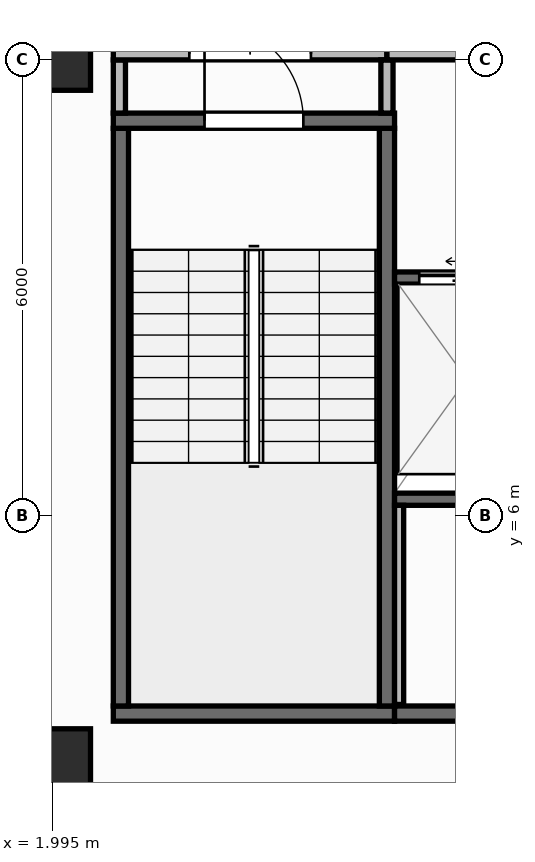
"""IFC4 building model, lengths in metres.
Left out: names, types, materials, properties, quantities, classifications, styles, units other than length and angle.
Written with IfcOpenShell. Run it as: python <this file> out.ifc"""

import sys

from ifc_helpers import new_model, si_unit, direction, frame, frame_2d, origin, origin_2d, place, context, subcontext, project, spatial, rectangle, extrude, element, fill, save


model = new_model("IFC4")
c1 = context("Model", 3, precision=1e-05, world=origin(), true_north=direction((0.0, 1.0)))
c2 = subcontext(c1, "Body", "Model", "MODEL_VIEW")
j1 = project(units=[si_unit("LENGTHUNIT", "METRE"), si_unit("PLANEANGLEUNIT", "RADIAN")], contexts=[c1])
p1 = place(None, origin())
s1 = spatial("IfcSite", under=j1, at=p1, CompositionType="ELEMENT")
p2 = place(p1, origin())
s2 = spatial("IfcBuilding", under=s1, at=p2, CompositionType="ELEMENT")
p3 = place(p2, frame((0.0, 0.0, 268.4)))
s3 = spatial("IfcBuildingStorey", under=s2, at=p3, CompositionType="ELEMENT", Elevation=268.4)
for number, where, z_axis, x_axis in (
    (1, (2.1, 2.8, 0.0), (0.0, 0.0, 1.0), (1.0, 0.0, 0.0)),
    (2, (2.1, 12.0, 0.0), (0.0, 0.0, 1.0), (1.0, 0.0, 0.0)),
):
    element("IfcColumn", number, at=place(p3, frame(where, z_axis=z_axis, x_axis=x_axis)), inside=s3, PredefinedType="COLUMN", context=c2, shape_type="SweptSolid", body=[
        extrude(rectangle(XDim=0.8, YDim=0.8, at=origin_2d()), origin(), (0.0, 0.0, 1.0), 3.95),
    ])
p4 = place(p3, frame((2.56, 0.173, 0.0), z_axis=(0.0, 0.0, 1.0), x_axis=(0.996798206282, 0.079958338856, 0.0)))
e3 = element("IfcWall", 3, at=p4, inside=s3, PredefinedType="STANDARD", context=c2, shape_type="SweptSolid", body=[
    extrude(rectangle(XDim=37.199, YDim=0.26, at=frame_2d((18.6, 0.0))), origin(), (0.0, 0.0, 1.0), 3.71),
])
p5 = place(p4, frame((17.4, 0.0, 0.9)))
e4 = element("IfcOpeningElement", 4, at=p5, cuts=e3, PredefinedType="OPENING", context=c2, shape_type="SweptSolid", body=[
    extrude(rectangle(XDim=2.4, YDim=1.65, at=frame_2d((1.2, 0.825))), frame((0.0, 0.14, 0.0), z_axis=(0.0, -1.0, 0.0), x_axis=(1.0, 0.0, 0.0)), (0.0, 0.0, 1.0), 0.28),
])
p6 = place(p3, frame((2.8, 3.4, 0.0), z_axis=(0.0, 0.0, 1.0), x_axis=(1.0, 0.0, 0.0)))
e5 = element("IfcWall", 5, at=p6, inside=s3, PredefinedType="SHEAR", context=c2, shape_type="SweptSolid", body=[
    extrude(rectangle(XDim=3.7, YDim=0.2, at=frame_2d((1.85, 0.0))), origin(), (0.0, 0.0, 1.0), 3.71),
])
for number, where, z_axis, x_axis in (
    (6, (2.9, 3.5, 0.0), (0.0, 0.0, 1.0), (0.0, 1.0, 0.0)),
    (7, (6.4, 3.5, 0.0), (0.0, 0.0, 1.0), (0.0, 1.0, 0.0)),
):
    element("IfcWall", number, at=place(p3, frame(where, z_axis=z_axis, x_axis=x_axis)), inside=s3, PredefinedType="SHEAR", context=c2, shape_type="SweptSolid", body=[
        extrude(rectangle(XDim=7.6, YDim=0.2, at=frame_2d((3.8, 0.0))), origin(), (0.0, 0.0, 1.0), 3.71),
    ])
p7 = place(p3, frame((2.8, 11.2, 0.0), z_axis=(0.0, 0.0, 1.0), x_axis=(1.0, 0.0, 0.0)))
e8 = element("IfcWall", 8, at=p7, inside=s3, PredefinedType="SHEAR", context=c2, shape_type="SweptSolid", body=[
    extrude(rectangle(XDim=3.7, YDim=0.2, at=frame_2d((1.85, 0.0))), origin(), (0.0, 0.0, 1.0), 3.71),
])
p8 = place(p7, frame((1.2, 0.0, 0.0)))
e9 = element("IfcOpeningElement", 9, at=p8, cuts=e8, PredefinedType="OPENING", context=c2, shape_type="SweptSolid", body=[
    extrude(rectangle(XDim=1.3, YDim=2.15, at=frame_2d((0.65, 1.075))), frame((0.0, 0.11, 0.0), z_axis=(0.0, -1.0, 0.0), x_axis=(1.0, 0.0, 0.0)), (0.0, 0.0, 1.0), 0.22),
])
p9 = place(p3, frame((6.5, 3.4, 0.0), z_axis=(0.0, 0.0, 1.0), x_axis=(1.0, 0.0, 0.0)))
e10 = element("IfcWall", 10, at=p9, inside=s3, PredefinedType="SHEAR", context=c2, shape_type="SweptSolid", body=[
    extrude(rectangle(XDim=13.7, YDim=0.2, at=frame_2d((6.85, 0.0))), origin(), (0.0, 0.0, 1.0), 3.71),
])
p10 = place(p3, frame((6.5, 6.22, 0.0), z_axis=(0.0, 0.0, 1.0), x_axis=(1.0, 0.0, 0.0)))
e11 = element("IfcWall", 11, at=p10, inside=s3, PredefinedType="SHEAR", context=c2, shape_type="SweptSolid", body=[
    extrude(rectangle(XDim=12.11, YDim=0.16, at=frame_2d((6.055, 0.0))), origin(), (0.0, 0.0, 1.0), 3.71),
])
p11 = place(p3, frame((6.5, 9.13, 0.0), z_axis=(0.0, 0.0, 1.0), x_axis=(1.0, 0.0, 0.0)))
e12 = element("IfcWall", 12, at=p11, inside=s3, PredefinedType="SHEAR", context=c2, shape_type="SweptSolid", body=[
    extrude(rectangle(XDim=1.975, YDim=0.16, at=frame_2d((0.988, 0.0))), origin(), (0.0, 0.0, 1.0), 3.71),
])
p12 = place(p11, frame((0.325, 0.0, 0.0)))
e13 = element("IfcOpeningElement", 13, at=p12, cuts=e12, PredefinedType="OPENING", context=c2, shape_type="SweptSolid", body=[
    extrude(rectangle(XDim=1.25, YDim=2.15, at=frame_2d((0.625, 1.075))), frame((0.0, 0.09, 0.0), z_axis=(0.0, -1.0, 0.0), x_axis=(1.0, 0.0, 0.0)), (0.0, 0.0, 1.0), 0.18),
])
p13 = place(p3, frame((6.56, 3.52, 0.0), z_axis=(0.0, 0.0, 1.0), x_axis=(0.0, 1.0, 0.0)))
e14 = element("IfcWall", 14, at=p13, inside=s3, PredefinedType="PARTITIONING", context=c2, shape_type="SweptSolid", body=[
    extrude(rectangle(XDim=2.62, YDim=0.12, at=frame_2d((1.31, 0.0))), origin(), (0.0, 0.0, 1.0), 3.71),
])
p14 = place(p3, frame((2.88, 11.3, 0.0), z_axis=(0.0, 0.0, 1.0), x_axis=(0.0, 1.0, 0.0)))
e15 = element("IfcWall", 15, at=p14, inside=s3, PredefinedType="PARTITIONING", context=c2, shape_type="SweptSolid", body=[
    extrude(rectangle(XDim=0.7, YDim=0.16, at=frame_2d((0.35, 0.0))), origin(), (0.0, 0.0, 1.0), 3.71),
])
p15 = place(p3, frame((2.8, 12.08, 0.0), z_axis=(0.0, 0.0, 1.0), x_axis=(1.0, 0.0, 0.0)))
e16 = element("IfcWall", 16, at=p15, inside=s3, PredefinedType="PARTITIONING", context=c2, shape_type="SweptSolid", body=[
    extrude(rectangle(XDim=3.6, YDim=0.16, at=frame_2d((1.8, 0.0))), origin(), (0.0, 0.0, 1.0), 3.157),
])
p16 = place(p15, frame((1.0, 0.0, 0.0)))
e17 = element("IfcOpeningElement", 17, at=p16, cuts=e16, PredefinedType="OPENING", context=c2, shape_type="SweptSolid", body=[
    extrude(rectangle(XDim=1.6, YDim=2.05, at=frame_2d((0.8, 1.025))), frame((0.0, 0.09, 0.0), z_axis=(0.0, -1.0, 0.0), x_axis=(1.0, 0.0, 0.0)), (0.0, 0.0, 1.0), 0.18),
])
p17 = place(p3, frame((6.4, 11.3, 0.0), z_axis=(0.0, 0.0, 1.0), x_axis=(0.0, 1.0, 0.0)))
e18 = element("IfcWall", 18, at=p17, inside=s3, PredefinedType="PARTITIONING", context=c2, shape_type="SweptSolid", body=[
    extrude(rectangle(XDim=0.7, YDim=0.16, at=frame_2d((0.35, 0.0))), origin(), (0.0, 0.0, 1.0), 3.71),
])
p18 = place(p3, frame((6.4, 12.08, 0.0), z_axis=(0.0, 0.0, 1.0), x_axis=(1.0, 0.0, 0.0)))
e19 = element("IfcWall", 19, at=p18, inside=s3, PredefinedType="PARTITIONING", context=c2, shape_type="SweptSolid", body=[
    extrude(rectangle(XDim=6.18, YDim=0.16, at=frame_2d((3.09, 0.0))), origin(), (0.0, 0.0, 1.0), 3.157),
])
p19 = place(p18, frame((2.29, 0.0, 0.0)))
e20 = element("IfcOpeningElement", 20, at=p19, cuts=e19, PredefinedType="OPENING", context=c2, shape_type="SweptSolid", body=[
    extrude(rectangle(XDim=1.6, YDim=2.05, at=frame_2d((0.8, 1.025))), frame((0.0, 0.09, 0.0), z_axis=(0.0, -1.0, 0.0), x_axis=(1.0, 0.0, 0.0)), (0.0, 0.0, 1.0), 0.18),
])
p20 = place(p8, origin())
e21 = element("IfcDoor", 21, at=p20, inside=s3, OperationType="SINGLE_SWING_LEFT", PredefinedType="DOOR", context=c2, shape_type="SweptSolid", body=[
    extrude(rectangle(XDim=1.3, YDim=2.15, at=frame_2d((0.65, 1.075))), frame((0.0, 0.025, 0.0), z_axis=(0.0, -1.0, 0.0), x_axis=(1.0, 0.0, 0.0)), (0.0, 0.0, 1.0), 0.05),
])
fill(e9, e21)
p21 = place(p12, origin())
e22 = element("IfcDoor", 22, at=p21, inside=s3, OperationType="SLIDING_TO_LEFT", PredefinedType="DOOR", context=c2, shape_type="SweptSolid", body=[
    extrude(rectangle(XDim=1.25, YDim=2.15, at=frame_2d((0.625, 1.075))), frame((0.0, 0.025, 0.0), z_axis=(0.0, -1.0, 0.0), x_axis=(1.0, 0.0, 0.0)), (0.0, 0.0, 1.0), 0.05),
])
fill(e13, e22)
p22 = place(p16, origin())
e23 = element("IfcDoor", 23, at=p22, inside=s3, OperationType="DOUBLE_DOOR_SINGLE_SWING", PredefinedType="DOOR", context=c2, shape_type="SweptSolid", body=[
    extrude(rectangle(XDim=1.6, YDim=2.05, at=frame_2d((0.8, 1.025))), frame((0.0, 0.025, 0.0), z_axis=(0.0, -1.0, 0.0), x_axis=(1.0, 0.0, 0.0)), (0.0, 0.0, 1.0), 0.05),
])
fill(e17, e23)
save(model, sys.argv[1])
